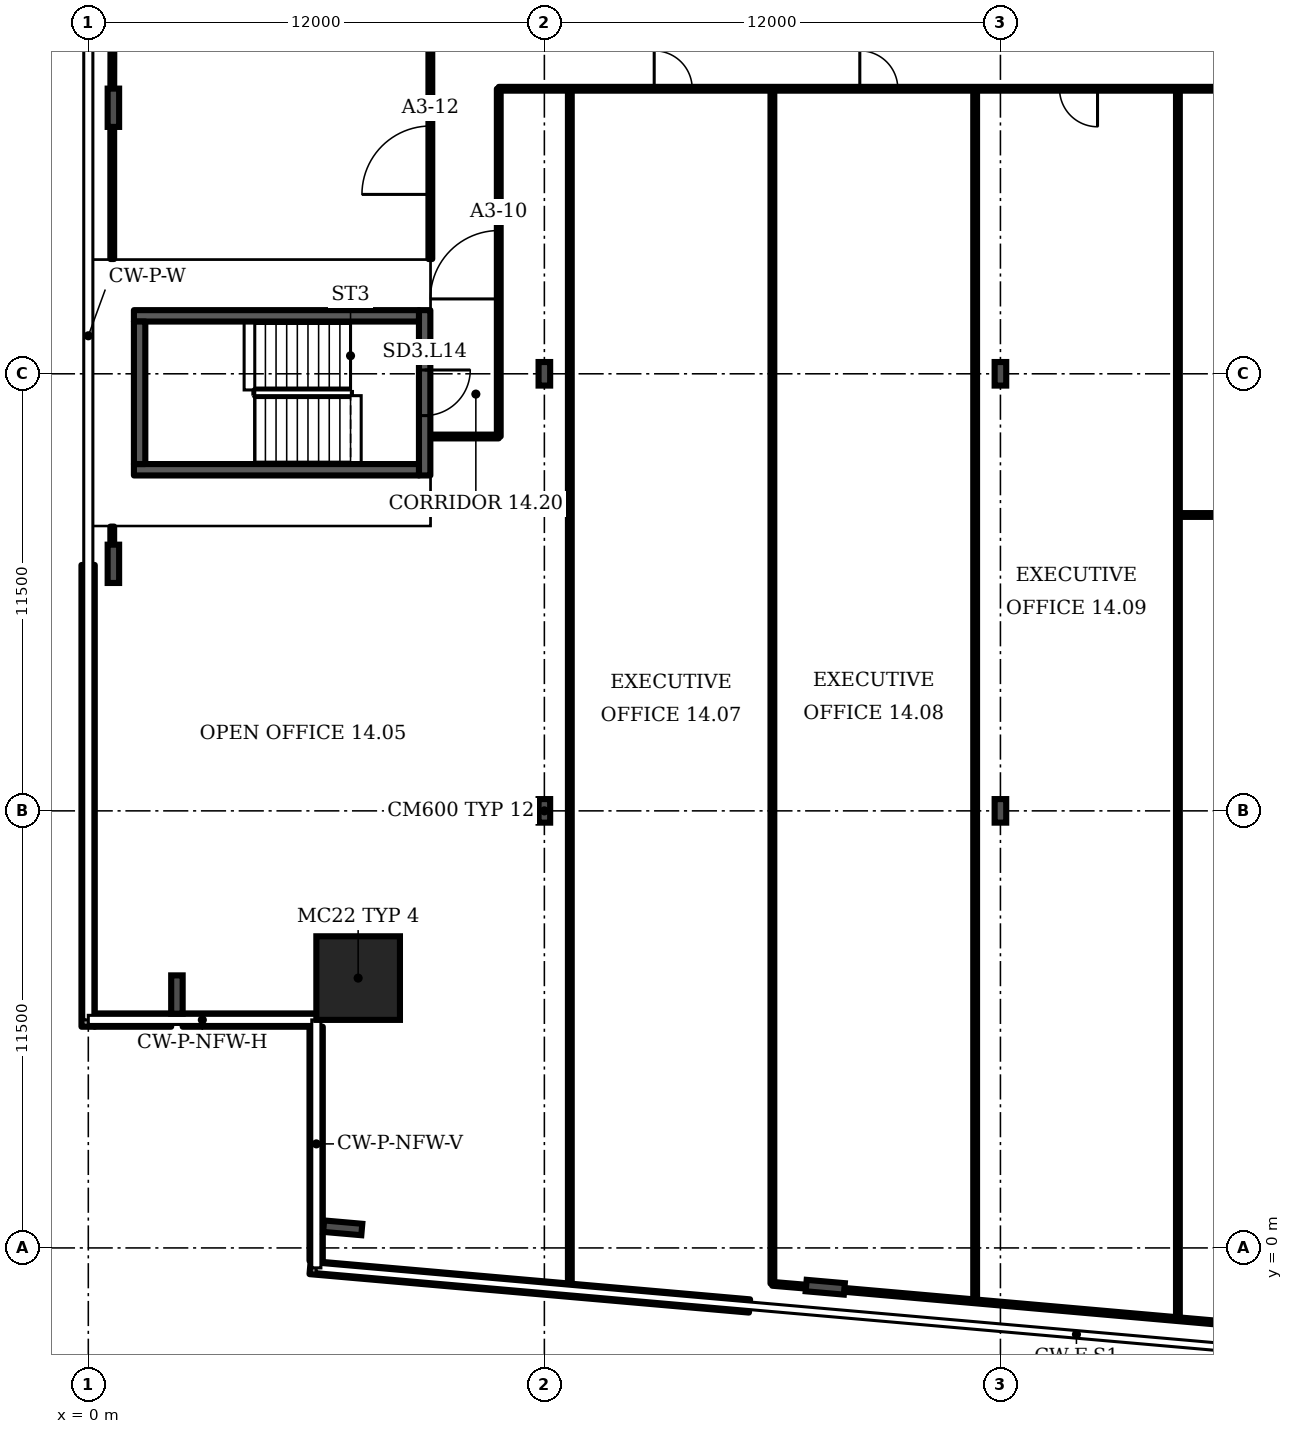
"""IFC4 building model, lengths in metres.
Left out: names, types, materials, properties, quantities, classifications, styles, units other than length and angle.
Written with IfcOpenShell. Run it as: python <this file> out.ifc"""

import sys

from ifc_helpers import new_model, si_unit, direction, frame, frame_2d, origin, origin_2d, place, context, subcontext, project, spatial, rectangle, i_section, extrude, element, fill, save


model = new_model("IFC4")
c1 = context("Model", 3, precision=1e-05, world=origin(), true_north=direction((0.0, 1.0)))
c2 = subcontext(c1, "Body", "Model", "MODEL_VIEW")
j1 = project(units=[si_unit("LENGTHUNIT", "METRE"), si_unit("PLANEANGLEUNIT", "RADIAN")], contexts=[c1])
p1 = place(None, origin())
s1 = spatial("IfcSite", under=j1, at=p1, CompositionType="ELEMENT")
p2 = place(p1, origin())
s2 = spatial("IfcBuilding", under=s1, at=p2, CompositionType="ELEMENT")
p3 = place(p2, frame((0.0, 0.0, 70.3)))
s3 = spatial("IfcBuildingStorey", under=s2, at=p3, CompositionType="ELEMENT", Elevation=70.3)
p4 = place(p3, frame((7.1, 7.1, 0.0), z_axis=(0.0, 0.0, 1.0), x_axis=(1.0, 0.0, 0.0)))
e1 = element("IfcColumn", 1, at=p4, inside=s3, PredefinedType="COLUMN", context=c2, shape_type="SweptSolid", body=[
    extrude(rectangle(XDim=2.2, YDim=2.2, at=origin_2d()), origin(), (0.0, 0.0, 1.0), 3.6),
])
for number, where, z_axis, x_axis in (
    (2, (6.694, 0.529, 0.0), (0.0, 0.0, 1.0), (-0.087, -0.996, 0.0)),
    (3, (19.391, -1.034, 0.0), (0.0, 0.0, 1.0), (-0.087, -0.996, 0.0)),
    (4, (0.66, 30.0, 0.0), (0.0, 0.0, 1.0), (-1.0, 0.0, 0.0)),
    (5, (0.66, 18.0, 0.0), (0.0, 0.0, 1.0), (-1.0, 0.0, 0.0)),
    (6, (2.332, 6.667, 0.0), (0.0, 0.0, 1.0), (-1.0, 0.0, 0.0)),
):
    element("IfcColumn", number, at=place(p3, frame(where, z_axis=z_axis, x_axis=x_axis)), inside=s3, PredefinedType="COLUMN", context=c2, shape_type="SweptSolid", body=[
        extrude(i_section(OverallWidth=0.302, OverallDepth=1.008, WebThickness=0.021, FlangeThickness=0.04, FilletRadius=0.03, at=origin_2d()), origin(), (0.0, 0.0, 1.0), 3.6),
    ])
for number, where, z_axis, x_axis in (
    (7, (12.0, 11.5, 0.0), (0.0, 0.0, 1.0), (1.0, 0.0, 0.0)),
    (8, (24.0, 11.5, 0.0), (0.0, 0.0, 1.0), (1.0, 0.0, 0.0)),
    (9, (12.0, 23.0, 0.0), (0.0, 0.0, 1.0), (1.0, 0.0, 0.0)),
    (10, (24.0, 23.0, 0.0), (0.0, 0.0, 1.0), (1.0, 0.0, 0.0)),
):
    element("IfcColumn", number, at=place(p3, frame(where, z_axis=z_axis, x_axis=x_axis)), inside=s3, PredefinedType="COLUMN", context=c2, shape_type="SweptSolid", body=[
        extrude(i_section(OverallWidth=0.305, OverallDepth=0.62, WebThickness=0.021, FlangeThickness=0.04, FilletRadius=0.027, at=origin_2d()), origin(), (0.0, 0.0, 1.0), 3.6),
    ])
p5 = place(p3, frame((5.835, -0.516, 0.0), z_axis=(0.0, 0.0, 1.0), x_axis=(0.996192, -0.087142, 0.0)))
e11 = element("IfcWall", 11, at=p5, inside=s3, PredefinedType="SOLIDWALL", context=c2, shape_type="SweptSolid", body=[
    extrude(rectangle(XDim=11.607, YDim=0.35, at=frame_2d((5.804, 0.0))), origin(), (0.0, 0.0, 1.0), 1.0),
])
p6 = place(p3, frame((-0.005, 17.97, 0.0), z_axis=(0.0, 0.0, 1.0), x_axis=(0.0, -1.0, 0.0)))
e12 = element("IfcWall", 12, at=p6, inside=s3, PredefinedType="SOLIDWALL", context=c2, shape_type="SweptSolid", body=[
    extrude(rectangle(XDim=12.15, YDim=0.35, at=frame_2d((6.075, 0.0))), origin(), (0.0, 0.0, 1.0), 1.0),
])
p7 = place(p3, frame((0.17, 5.995, 0.0), z_axis=(0.0, 0.0, 1.0), x_axis=(1.0, 0.0, 0.0)))
e13 = element("IfcWall", 13, at=p7, inside=s3, PredefinedType="SOLIDWALL", context=c2, shape_type="SweptSolid", body=[
    extrude(rectangle(XDim=2.011, YDim=0.35, at=frame_2d((1.005, 0.0))), origin(), (0.0, 0.0, 1.0), 1.0),
])
p8 = place(p3, frame((2.483, 5.995, 0.0), z_axis=(0.0, 0.0, 1.0), x_axis=(1.0, 0.0, 0.0)))
e14 = element("IfcWall", 14, at=p8, inside=s3, PredefinedType="SOLIDWALL", context=c2, shape_type="SweptSolid", body=[
    extrude(rectangle(XDim=3.517, YDim=0.35, at=frame_2d((1.759, 0.0))), origin(), (0.0, 0.0, 1.0), 1.0),
])
p9 = place(p3, frame((5.995, 5.82, 0.0), z_axis=(0.0, 0.0, 1.0), x_axis=(0.0, -1.0, 0.0)))
e15 = element("IfcWall", 15, at=p9, inside=s3, PredefinedType="SOLIDWALL", context=c2, shape_type="SweptSolid", body=[
    extrude(rectangle(XDim=6.161, YDim=0.35, at=frame_2d((3.081, 0.0))), origin(), (0.0, 0.0, 1.0), 1.0),
])
p10 = place(p3, frame((8.85, 20.325, 0.0), z_axis=(0.0, 0.0, 1.0), x_axis=(0.0, 1.0, 0.0)))
e16 = element("IfcWall", 16, at=p10, inside=s3, PredefinedType="SHEAR", context=c2, shape_type="SweptSolid", body=[
    extrude(rectangle(XDim=4.35, YDim=0.3, at=frame_2d((2.175, 0.0))), origin(), (0.0, 0.0, 1.0), 3.2),
])
p11 = place(p10, frame((1.575, 0.0, 0.0)))
e17 = element("IfcOpeningElement", 17, at=p11, cuts=e16, PredefinedType="OPENING", context=c2, shape_type="SweptSolid", body=[
    extrude(rectangle(XDim=1.2, YDim=2.1, at=frame_2d((0.6, 1.05))), frame((0.0, 0.16, 0.0), z_axis=(0.0, -1.0, 0.0), x_axis=(1.0, 0.0, 0.0)), (0.0, 0.0, 1.0), 0.32),
])
p12 = place(p3, frame((0.63, 17.5, 0.0), z_axis=(0.0, 0.0, 1.0), x_axis=(0.0, 1.0, 0.0)))
e18 = element("IfcWall", 18, at=p12, inside=s3, PredefinedType="PARTITIONING", context=c2, shape_type="SweptSolid", body=[
    extrude(rectangle(XDim=1.48, YDim=0.1, at=frame_2d((0.74, 0.0))), origin(), (0.0, 0.0, 1.0), 2.58),
])
p13 = place(p3, frame((0.63, 26.02, 0.0), z_axis=(0.0, 0.0, 1.0), x_axis=(0.0, 1.0, 0.0)))
e19 = element("IfcWall", 19, at=p13, inside=s3, PredefinedType="PARTITIONING", context=c2, shape_type="SweptSolid", body=[
    extrude(rectangle(XDim=3.98, YDim=0.1, at=frame_2d((1.99, 0.0))), origin(), (0.0, 0.0, 1.0), 2.58),
])
p14 = place(p3, frame((0.63, 30.0, 0.0), z_axis=(0.0, 0.0, 1.0), x_axis=(0.00218, 0.999994, 0.0)))
e20 = element("IfcWall", 20, at=p14, inside=s3, PredefinedType="PARTITIONING", context=c2, shape_type="SweptSolid", body=[
    extrude(rectangle(XDim=11.535, YDim=0.1, at=frame_2d((5.768, 0.0))), origin(), (0.0, 0.0, 1.0), 2.58),
])
p15 = place(p3, frame((9.0, 26.02, 0.0), z_axis=(0.0, 0.0, 1.0), x_axis=(0.0, 1.0, 0.0)))
e21 = element("IfcWall", 21, at=p15, inside=s3, PredefinedType="PARTITIONING", context=c2, shape_type="SweptSolid", body=[
    extrude(rectangle(XDim=7.96, YDim=0.1, at=frame_2d((3.98, 0.0))), origin(), (0.0, 0.0, 1.0), 3.2),
])
p16 = place(p15, frame((1.7, 0.0, 0.0)))
e22 = element("IfcOpeningElement", 22, at=p16, cuts=e21, PredefinedType="OPENING", context=c2, shape_type="SweptSolid", body=[
    extrude(rectangle(XDim=1.8, YDim=2.1, at=frame_2d((0.9, 1.05))), frame((0.0, 0.06, 0.0), z_axis=(0.0, -1.0, 0.0), x_axis=(1.0, 0.0, 0.0)), (0.0, 0.0, 1.0), 0.12),
])
p17 = place(p3, frame((9.02, 21.35, 0.0), z_axis=(0.0, 0.0, 1.0), x_axis=(1.0, 0.0, 0.0)))
e23 = element("IfcWall", 23, at=p17, inside=s3, PredefinedType="PARTITIONING", context=c2, shape_type="SweptSolid", body=[
    extrude(rectangle(XDim=1.78, YDim=0.1, at=frame_2d((0.89, 0.0))), origin(), (0.0, 0.0, 1.0), 3.2),
])
p18 = place(p3, frame((10.8, 21.35, 0.0), z_axis=(0.0, 0.0, 1.0), x_axis=(0.0, 1.0, 0.0)))
e24 = element("IfcWall", 24, at=p18, inside=s3, PredefinedType="PARTITIONING", context=c2, shape_type="SweptSolid", body=[
    extrude(rectangle(XDim=9.15, YDim=0.1, at=frame_2d((4.575, 0.0))), origin(), (0.0, 0.0, 1.0), 3.2),
])
p19 = place(p18, frame((3.62, 0.0, 0.0)))
e25 = element("IfcOpeningElement", 25, at=p19, cuts=e24, PredefinedType="OPENING", context=c2, shape_type="SweptSolid", body=[
    extrude(rectangle(XDim=1.8, YDim=2.1, at=frame_2d((0.9, 1.05))), frame((0.0, 0.06, 0.0), z_axis=(0.0, -1.0, 0.0), x_axis=(1.0, 0.0, 0.0)), (0.0, 0.0, 1.0), 0.12),
])
p20 = place(p3, frame((10.8, 30.5, 0.0), z_axis=(0.0, 0.0, 1.0), x_axis=(1.0, 0.0, 0.0)))
e26 = element("IfcWall", 26, at=p20, inside=s3, PredefinedType="PARTITIONING", context=c2, shape_type="SweptSolid", body=[
    extrude(rectangle(XDim=26.05, YDim=0.1, at=frame_2d((13.025, 0.0))), origin(), (0.0, 0.0, 1.0), 3.2),
])
p21 = place(p20, frame((4.09, 0.0, 0.0)))
e27 = element("IfcOpeningElement", 27, at=p21, cuts=e26, PredefinedType="OPENING", context=c2, shape_type="SweptSolid", body=[
    extrude(rectangle(XDim=1.0, YDim=2.1, at=frame_2d((0.5, 1.05))), frame((0.0, 0.06, 0.0), z_axis=(0.0, -1.0, 0.0), x_axis=(1.0, 0.0, 0.0)), (0.0, 0.0, 1.0), 0.12),
])
p22 = place(p20, frame((9.5, 0.0, 0.0)))
e28 = element("IfcOpeningElement", 28, at=p22, cuts=e26, PredefinedType="OPENING", context=c2, shape_type="SweptSolid", body=[
    extrude(rectangle(XDim=1.0, YDim=2.1, at=frame_2d((0.5, 1.05))), frame((0.0, 0.06, 0.0), z_axis=(0.0, -1.0, 0.0), x_axis=(1.0, 0.0, 0.0)), (0.0, 0.0, 1.0), 0.12),
])
p23 = place(p20, frame((14.755, 0.0, 0.0)))
e29 = element("IfcOpeningElement", 29, at=p23, cuts=e26, PredefinedType="OPENING", context=c2, shape_type="SweptSolid", body=[
    extrude(rectangle(XDim=1.0, YDim=2.1, at=frame_2d((0.5, 1.05))), frame((0.0, 0.06, 0.0), z_axis=(0.0, -1.0, 0.0), x_axis=(1.0, 0.0, 0.0)), (0.0, 0.0, 1.0), 0.12),
])
p24 = place(p20, frame((21.49, 0.0, 0.0)))
e30 = element("IfcOpeningElement", 30, at=p24, cuts=e26, PredefinedType="OPENING", context=c2, shape_type="SweptSolid", body=[
    extrude(rectangle(XDim=1.0, YDim=2.1, at=frame_2d((0.5, 1.05))), frame((0.0, 0.06, 0.0), z_axis=(0.0, -1.0, 0.0), x_axis=(1.0, 0.0, 0.0)), (0.0, 0.0, 1.0), 0.12),
])
p25 = place(p3, frame((12.67, -1.088, 0.0), z_axis=(0.0, 0.0, 1.0), x_axis=(0.0, 1.0, 0.0)))
e31 = element("IfcWall", 31, at=p25, inside=s3, PredefinedType="PARTITIONING", context=c2, shape_type="SweptSolid", body=[
    extrude(rectangle(XDim=31.588, YDim=0.1, at=frame_2d((15.794, 0.0))), origin(), (0.0, 0.0, 1.0), 3.2),
])
p26 = place(p3, frame((18.0, -0.94, 0.0), z_axis=(0.0, 0.0, 1.0), x_axis=(0.0, 1.0, 0.0)))
e32 = element("IfcWall", 32, at=p26, inside=s3, PredefinedType="PARTITIONING", context=c2, shape_type="SweptSolid", body=[
    extrude(rectangle(XDim=31.44, YDim=0.1, at=frame_2d((15.72, 0.0))), origin(), (0.0, 0.0, 1.0), 3.2),
])
p27 = place(p3, frame((18.89, -1.02, 0.0), z_axis=(0.0, 0.0, 1.0), x_axis=(-0.996474, 0.083928, 0.0)))
e33 = element("IfcWall", 33, at=p27, inside=s3, PredefinedType="PARTITIONING", context=c2, shape_type="SweptSolid", body=[
    extrude(rectangle(XDim=0.893, YDim=0.1, at=frame_2d((0.447, 0.0))), origin(), (0.0, 0.0, 1.0), 3.2),
])
p28 = place(p3, frame((23.335, -1.41, 0.0), z_axis=(0.0, 0.0, 1.0), x_axis=(0.0, 1.0, 0.0)))
e34 = element("IfcWall", 34, at=p28, inside=s3, PredefinedType="PARTITIONING", context=c2, shape_type="SweptSolid", body=[
    extrude(rectangle(XDim=31.91, YDim=0.1, at=frame_2d((15.955, 0.0))), origin(), (0.0, 0.0, 1.0), 3.2),
])
p29 = place(p3, frame((28.67, -1.875, 0.0), z_axis=(0.0, 0.0, 1.0), x_axis=(0.0, 1.0, 0.0)))
e35 = element("IfcWall", 35, at=p29, inside=s3, PredefinedType="PARTITIONING", context=c2, shape_type="SweptSolid", body=[
    extrude(rectangle(XDim=32.375, YDim=0.1, at=frame_2d((16.188, 0.0))), origin(), (0.0, 0.0, 1.0), 3.2),
])
p30 = place(p3, frame((28.67, 19.285, 0.0), z_axis=(0.0, 0.0, 1.0), x_axis=(1.0, 0.0, 0.0)))
e36 = element("IfcWall", 36, at=p30, inside=s3, PredefinedType="PARTITIONING", context=c2, shape_type="SweptSolid", body=[
    extrude(rectangle(XDim=9.81, YDim=0.1, at=frame_2d((4.905, 0.0))), origin(), (0.0, 0.0, 1.0), 3.2),
])
p31 = place(p3, frame((33.22, -2.275, 0.0), z_axis=(0.0, 0.0, 1.0), x_axis=(-0.99616, 0.087559, 0.0)))
e37 = element("IfcWall", 37, at=p31, inside=s3, PredefinedType="PARTITIONING", context=c2, shape_type="SweptSolid", body=[
    extrude(rectangle(XDim=14.385, YDim=0.1, at=frame_2d((7.192, 0.0))), origin(), (0.0, 0.0, 1.0), 2.58),
])
for number, where, z_axis, x_axis in (
    (38, (1.2, 20.475, 0.0), (0.0, 0.0, 1.0), (1.0, 0.0, 0.0)),
    (39, (1.2, 24.525, 0.0), (0.0, 0.0, 1.0), (1.0, 0.0, 0.0)),
):
    element("IfcWall", number, at=place(p3, frame(where, z_axis=z_axis, x_axis=x_axis)), inside=s3, PredefinedType="SHEAR", context=c2, shape_type="SweptSolid", body=[
        extrude(rectangle(XDim=7.5, YDim=0.3, at=frame_2d((3.75, 0.0))), origin(), (0.0, 0.0, 1.0), 3.2),
    ])
p32 = place(p3, frame((1.35, 20.625, 0.0), z_axis=(0.0, 0.0, 1.0), x_axis=(0.0, 1.0, 0.0)))
e40 = element("IfcWall", 40, at=p32, inside=s3, PredefinedType="SHEAR", context=c2, shape_type="SweptSolid", body=[
    extrude(rectangle(XDim=3.75, YDim=0.3, at=frame_2d((1.875, 0.0))), origin(), (0.0, 0.0, 1.0), 3.2),
])
p33 = place(p11, origin())
e41 = element("IfcDoor", 41, at=p33, inside=s3, OperationType="SINGLE_SWING_RIGHT", PredefinedType="DOOR", context=c2, shape_type="SweptSolid", body=[
    extrude(rectangle(XDim=1.2, YDim=2.1, at=frame_2d((0.6, 1.05))), frame((0.0, 0.025, 0.0), z_axis=(0.0, -1.0, 0.0), x_axis=(1.0, 0.0, 0.0)), (0.0, 0.0, 1.0), 0.05),
])
fill(e17, e41)
p34 = place(p19, origin())
e42 = element("IfcDoor", 42, at=p34, inside=s3, OperationType="DOUBLE_DOOR_SINGLE_SWING", PredefinedType="DOOR", context=c2, shape_type="SweptSolid", body=[
    extrude(rectangle(XDim=1.8, YDim=2.1, at=frame_2d((0.9, 1.05))), frame((0.0, 0.025, 0.0), z_axis=(0.0, -1.0, 0.0), x_axis=(1.0, 0.0, 0.0)), (0.0, 0.0, 1.0), 0.05),
])
fill(e25, e42)
p35 = place(p16, origin())
e43 = element("IfcDoor", 43, at=p35, inside=s3, OperationType="DOUBLE_DOOR_SINGLE_SWING", PredefinedType="DOOR", context=c2, shape_type="SweptSolid", body=[
    extrude(rectangle(XDim=1.8, YDim=2.1, at=frame_2d((0.9, 1.05))), frame((0.0, 0.025, 0.0), z_axis=(0.0, -1.0, 0.0), x_axis=(1.0, 0.0, 0.0)), (0.0, 0.0, 1.0), 0.05),
])
fill(e22, e43)
p36 = place(p21, origin())
e44 = element("IfcDoor", 44, at=p36, inside=s3, OperationType="SINGLE_SWING_LEFT", PredefinedType="DOOR", context=c2, shape_type="SweptSolid", body=[
    extrude(rectangle(XDim=1.0, YDim=2.1, at=frame_2d((0.5, 1.05))), frame((0.0, 0.025, 0.0), z_axis=(0.0, -1.0, 0.0), x_axis=(1.0, 0.0, 0.0)), (0.0, 0.0, 1.0), 0.05),
])
fill(e27, e44)
p37 = place(p22, origin())
e45 = element("IfcDoor", 45, at=p37, inside=s3, OperationType="SINGLE_SWING_LEFT", PredefinedType="DOOR", context=c2, shape_type="SweptSolid", body=[
    extrude(rectangle(XDim=1.0, YDim=2.1, at=frame_2d((0.5, 1.05))), frame((0.0, 0.025, 0.0), z_axis=(0.0, -1.0, 0.0), x_axis=(1.0, 0.0, 0.0)), (0.0, 0.0, 1.0), 0.05),
])
fill(e28, e45)
p38 = place(p23, origin())
e46 = element("IfcDoor", 46, at=p38, inside=s3, OperationType="SINGLE_SWING_RIGHT", PredefinedType="DOOR", context=c2, shape_type="SweptSolid", body=[
    extrude(rectangle(XDim=1.0, YDim=2.1, at=frame_2d((0.5, 1.05))), frame((0.0, 0.025, 0.0), z_axis=(0.0, -1.0, 0.0), x_axis=(1.0, 0.0, 0.0)), (0.0, 0.0, 1.0), 0.05),
])
fill(e29, e46)
save(model, sys.argv[1])
